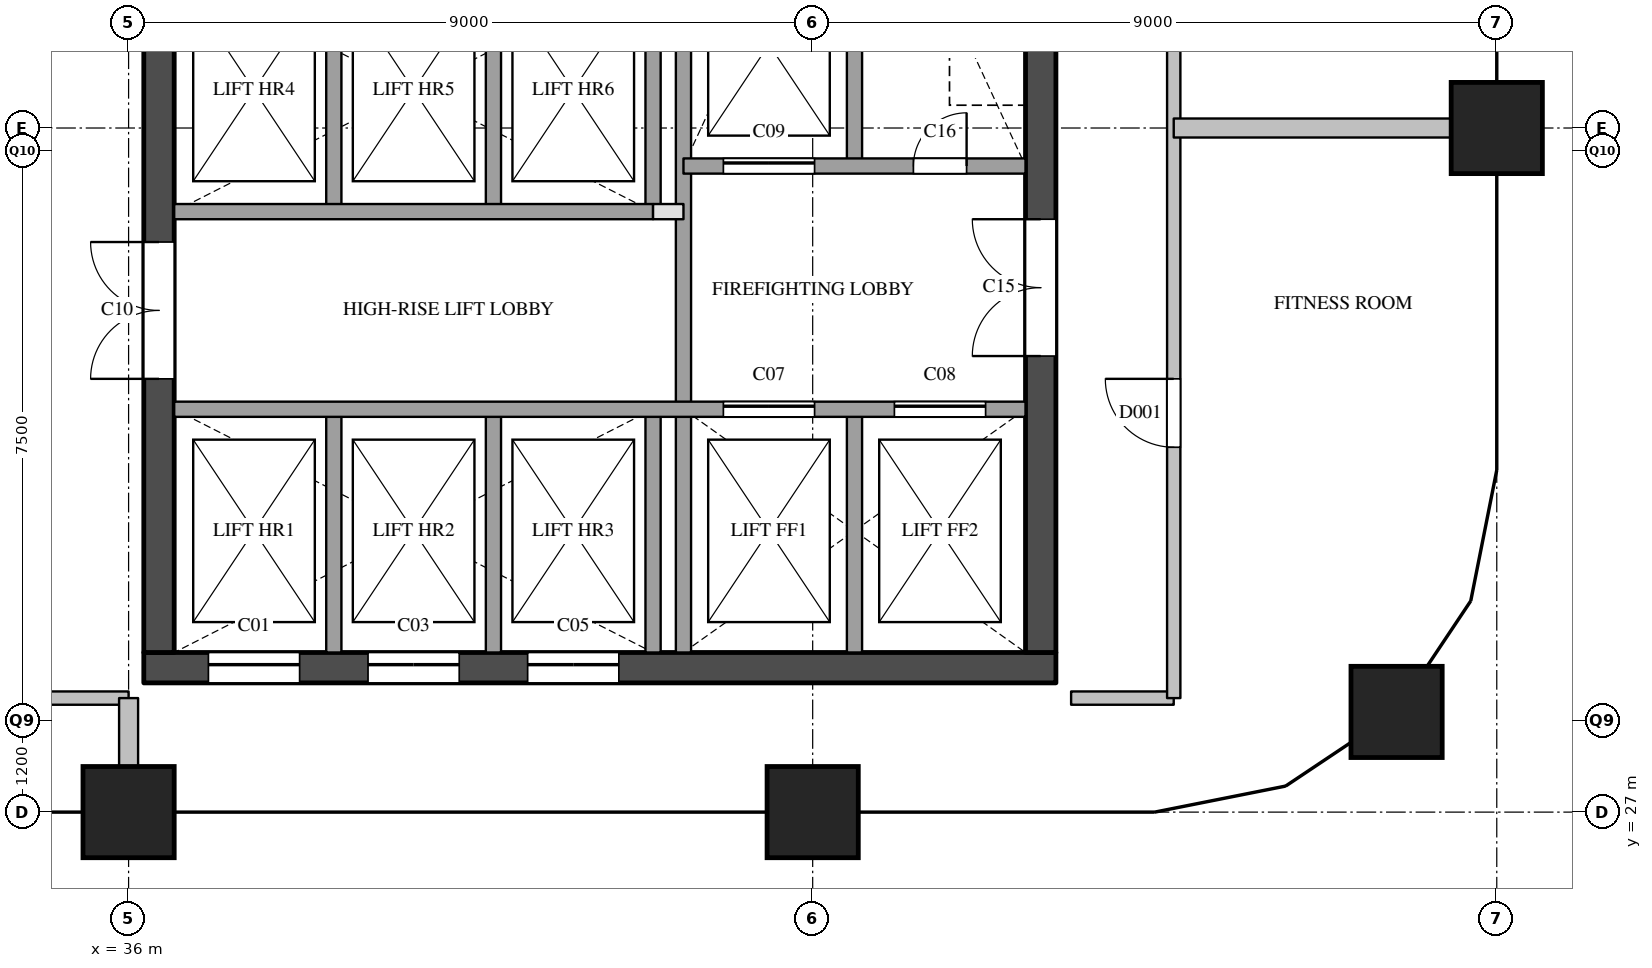
"""IFC4 building model, lengths in metres.
Left out: names, types, materials, properties, quantities, classifications, styles, units other than length and angle.
Written with IfcOpenShell. Run it as: python <this file> out.ifc"""

import sys

from ifc_helpers import new_model, si_unit, direction, frame, frame_2d, origin, origin_2d, place, context, subcontext, project, spatial, rectangle, extrude, element, fill, save


model = new_model("IFC4")
c1 = context("Model", 3, precision=1e-05, world=origin(), true_north=direction((0.0, 1.0)))
c2 = subcontext(c1, "Body", "Model", "MODEL_VIEW")
j1 = project(units=[si_unit("LENGTHUNIT", "METRE"), si_unit("PLANEANGLEUNIT", "RADIAN")], contexts=[c1])
p1 = place(None, origin())
s1 = spatial("IfcSite", under=j1, at=p1, CompositionType="ELEMENT")
p2 = place(p1, origin())
s2 = spatial("IfcBuilding", under=s1, at=p2, CompositionType="ELEMENT")
p3 = place(p2, frame((0.0, 0.0, 230.6)))
s3 = spatial("IfcBuildingStorey", under=s2, at=p3, CompositionType="ELEMENT", Elevation=230.6)
for number, where, z_axis, x_axis in (
    (1, (36.0, 27.0, 0.0), (0.0, 0.0, 1.0), (1.0, 0.0, 0.0)),
    (2, (45.0, 27.0, 0.0), (0.0, 0.0, 1.0), (1.0, 0.0, 0.0)),
    (3, (52.682, 28.318, 0.0), (0.0, 0.0, 1.0), (1.0, 0.0, 0.0)),
    (4, (54.0, 36.0, 0.0), (0.0, 0.0, 1.0), (1.0, 0.0, 0.0)),
):
    element("IfcColumn", number, at=place(p3, frame(where, z_axis=z_axis, x_axis=x_axis)), inside=s3, PredefinedType="COLUMN", context=c2, shape_type="SweptSolid", body=[
        extrude(rectangle(XDim=1.2, YDim=1.2, at=origin_2d()), origin(), (0.0, 0.0, 1.0), 3.9),
    ])
p4 = place(p3, frame((36.2, 28.9, 0.0), z_axis=(0.0, 0.0, 1.0), x_axis=(1.0, 0.0, 0.0)))
e5 = element("IfcWall", 5, at=p4, inside=s3, PredefinedType="SHEAR", context=c2, shape_type="SweptSolid", body=[
    extrude(rectangle(XDim=12.0, YDim=0.4, at=frame_2d((6.0, 0.0))), origin(), (0.0, 0.0, 1.0), 3.6),
])
p5 = place(p4, frame((0.85, 0.0, 0.0)))
e6 = element("IfcOpeningElement", 6, at=p5, cuts=e5, PredefinedType="OPENING", context=c2, shape_type="SweptSolid", body=[
    extrude(rectangle(XDim=1.2, YDim=2.1, at=frame_2d((0.6, 1.05))), frame((0.0, 0.21, 0.0), z_axis=(0.0, -1.0, 0.0), x_axis=(1.0, 0.0, 0.0)), (0.0, 0.0, 1.0), 0.42),
])
p6 = place(p4, frame((2.95, 0.0, 0.0)))
e7 = element("IfcOpeningElement", 7, at=p6, cuts=e5, PredefinedType="OPENING", context=c2, shape_type="SweptSolid", body=[
    extrude(rectangle(XDim=1.2, YDim=2.1, at=frame_2d((0.6, 1.05))), frame((0.0, 0.21, 0.0), z_axis=(0.0, -1.0, 0.0), x_axis=(1.0, 0.0, 0.0)), (0.0, 0.0, 1.0), 0.42),
])
p7 = place(p4, frame((5.05, 0.0, 0.0)))
e8 = element("IfcOpeningElement", 8, at=p7, cuts=e5, PredefinedType="OPENING", context=c2, shape_type="SweptSolid", body=[
    extrude(rectangle(XDim=1.2, YDim=2.1, at=frame_2d((0.6, 1.05))), frame((0.0, 0.21, 0.0), z_axis=(0.0, -1.0, 0.0), x_axis=(1.0, 0.0, 0.0)), (0.0, 0.0, 1.0), 0.42),
])
p8 = place(p3, frame((36.4, 29.1, 0.0), z_axis=(0.0, 0.0, 1.0), x_axis=(0.0, 1.0, 0.0)))
e9 = element("IfcWall", 9, at=p8, inside=s3, PredefinedType="SHEAR", context=c2, shape_type="SweptSolid", body=[
    extrude(rectangle(XDim=20.3, YDim=0.4, at=frame_2d((10.15, 0.0))), origin(), (0.0, 0.0, 1.0), 3.6),
])
p9 = place(p8, frame((3.6, 0.0, 0.0)))
e10 = element("IfcOpeningElement", 10, at=p9, cuts=e9, PredefinedType="OPENING", context=c2, shape_type="SweptSolid", body=[
    extrude(rectangle(XDim=1.8, YDim=2.1, at=frame_2d((0.9, 1.05))), frame((0.0, 0.21, 0.0), z_axis=(0.0, -1.0, 0.0), x_axis=(1.0, 0.0, 0.0)), (0.0, 0.0, 1.0), 0.42),
])
p10 = place(p3, frame((48.0, 29.1, 0.0), z_axis=(0.0, 0.0, 1.0), x_axis=(0.0, 1.0, 0.0)))
e11 = element("IfcWall", 11, at=p10, inside=s3, PredefinedType="SHEAR", context=c2, shape_type="SweptSolid", body=[
    extrude(rectangle(XDim=20.3, YDim=0.4, at=frame_2d((10.15, 0.0))), origin(), (0.0, 0.0, 1.0), 3.6),
])
p11 = place(p10, frame((12.5, 0.0, 0.0)))
e12 = element("IfcOpeningElement", 12, at=p11, cuts=e11, PredefinedType="OPENING", context=c2, shape_type="SweptSolid", body=[
    extrude(rectangle(XDim=0.7, YDim=2.1, at=frame_2d((0.35, 1.05))), frame((0.0, 0.21, 0.0), z_axis=(0.0, -1.0, 0.0), x_axis=(1.0, 0.0, 0.0)), (0.0, 0.0, 1.0), 0.42),
])
p12 = place(p10, frame((3.9, 0.0, 0.0)))
e13 = element("IfcOpeningElement", 13, at=p12, cuts=e11, PredefinedType="OPENING", context=c2, shape_type="SweptSolid", body=[
    extrude(rectangle(XDim=1.8, YDim=2.1, at=frame_2d((0.9, 1.05))), frame((0.0, 0.21, 0.0), z_axis=(0.0, -1.0, 0.0), x_axis=(1.0, 0.0, 0.0)), (0.0, 0.0, 1.0), 0.42),
])
p13 = place(p10, frame((16.4, 0.0, 0.0)))
e14 = element("IfcOpeningElement", 14, at=p13, cuts=e11, PredefinedType="OPENING", context=c2, shape_type="SweptSolid", body=[
    extrude(rectangle(XDim=1.0, YDim=2.1, at=frame_2d((0.5, 1.05))), frame((0.0, 0.21, 0.0), z_axis=(0.0, -1.0, 0.0), x_axis=(1.0, 0.0, 0.0)), (0.0, 0.0, 1.0), 0.42),
])
p14 = place(p3, frame((38.7, 29.1, 0.0), z_axis=(0.0, 0.0, 1.0), x_axis=(0.0, 1.0, 0.0)))
e15 = element("IfcWall", 15, at=p14, inside=s3, PredefinedType="SOLIDWALL", context=c2, shape_type="SweptSolid", body=[
    extrude(rectangle(XDim=3.2, YDim=0.2, at=frame_2d((1.6, 0.0))), origin(), (0.0, 0.0, 1.0), 3.6),
])
p15 = place(p3, frame((38.7, 34.9, 0.0), z_axis=(0.0, 0.0, 1.0), x_axis=(0.0, 1.0, 0.0)))
e16 = element("IfcWall", 16, at=p15, inside=s3, PredefinedType="SOLIDWALL", context=c2, shape_type="SweptSolid", body=[
    extrude(rectangle(XDim=3.2, YDim=0.2, at=frame_2d((1.6, 0.0))), origin(), (0.0, 0.0, 1.0), 3.6),
])
p16 = place(p3, frame((40.8, 29.1, 0.0), z_axis=(0.0, 0.0, 1.0), x_axis=(0.0, 1.0, 0.0)))
e17 = element("IfcWall", 17, at=p16, inside=s3, PredefinedType="SOLIDWALL", context=c2, shape_type="SweptSolid", body=[
    extrude(rectangle(XDim=3.2, YDim=0.2, at=frame_2d((1.6, 0.0))), origin(), (0.0, 0.0, 1.0), 3.6),
])
p17 = place(p3, frame((40.8, 34.9, 0.0), z_axis=(0.0, 0.0, 1.0), x_axis=(0.0, 1.0, 0.0)))
e18 = element("IfcWall", 18, at=p17, inside=s3, PredefinedType="SOLIDWALL", context=c2, shape_type="SweptSolid", body=[
    extrude(rectangle(XDim=3.2, YDim=0.2, at=frame_2d((1.6, 0.0))), origin(), (0.0, 0.0, 1.0), 3.6),
])
p18 = place(p3, frame((42.9, 29.1, 0.0), z_axis=(0.0, 0.0, 1.0), x_axis=(0.0, 1.0, 0.0)))
e19 = element("IfcWall", 19, at=p18, inside=s3, PredefinedType="SOLIDWALL", context=c2, shape_type="SweptSolid", body=[
    extrude(rectangle(XDim=3.2, YDim=0.2, at=frame_2d((1.6, 0.0))), origin(), (0.0, 0.0, 1.0), 3.6),
])
p19 = place(p3, frame((42.9, 34.9, 0.0), z_axis=(0.0, 0.0, 1.0), x_axis=(0.0, 1.0, 0.0)))
e20 = element("IfcWall", 20, at=p19, inside=s3, PredefinedType="SOLIDWALL", context=c2, shape_type="SweptSolid", body=[
    extrude(rectangle(XDim=3.2, YDim=0.2, at=frame_2d((1.6, 0.0))), origin(), (0.0, 0.0, 1.0), 3.6),
])
p20 = place(p3, frame((43.3, 29.1, 0.0), z_axis=(0.0, 0.0, 1.0), x_axis=(0.0, 1.0, 0.0)))
e21 = element("IfcWall", 21, at=p20, inside=s3, PredefinedType="SOLIDWALL", context=c2, shape_type="SweptSolid", body=[
    extrude(rectangle(XDim=9.9, YDim=0.2, at=frame_2d((4.95, 0.0))), origin(), (0.0, 0.0, 1.0), 3.6),
])
for number, where, z_axis, x_axis in (
    (22, (45.55, 29.1, 0.0), (0.0, 0.0, 1.0), (0.0, 1.0, 0.0)),
    (23, (45.55, 35.5, 0.0), (0.0, 0.0, 1.0), (0.0, 1.0, 0.0)),
):
    element("IfcWall", number, at=place(p3, frame(where, z_axis=z_axis, x_axis=x_axis)), inside=s3, PredefinedType="SOLIDWALL", context=c2, shape_type="SweptSolid", body=[
        extrude(rectangle(XDim=3.2, YDim=0.2, at=frame_2d((1.6, 0.0))), origin(), (0.0, 0.0, 1.0), 3.6),
    ])
p21 = place(p3, frame((36.6, 32.3, 0.0), z_axis=(0.0, 0.0, 1.0), x_axis=(1.0, 0.0, 0.0)))
e24 = element("IfcWall", 24, at=p21, inside=s3, PredefinedType="SOLIDWALL", context=c2, shape_type="SweptSolid", body=[
    extrude(rectangle(XDim=11.2, YDim=0.2, at=frame_2d((5.6, 0.0))), origin(), (0.0, 0.0, 1.0), 3.6),
])
p22 = place(p21, frame((7.225, 0.0, 0.0)))
e25 = element("IfcOpeningElement", 25, at=p22, cuts=e24, PredefinedType="OPENING", context=c2, shape_type="SweptSolid", body=[
    extrude(rectangle(XDim=1.2, YDim=2.1, at=frame_2d((0.6, 1.05))), frame((0.0, 0.11, 0.0), z_axis=(0.0, -1.0, 0.0), x_axis=(1.0, 0.0, 0.0)), (0.0, 0.0, 1.0), 0.22),
])
p23 = place(p21, frame((9.475, 0.0, 0.0)))
e26 = element("IfcOpeningElement", 26, at=p23, cuts=e24, PredefinedType="OPENING", context=c2, shape_type="SweptSolid", body=[
    extrude(rectangle(XDim=1.2, YDim=2.1, at=frame_2d((0.6, 1.05))), frame((0.0, 0.11, 0.0), z_axis=(0.0, -1.0, 0.0), x_axis=(1.0, 0.0, 0.0)), (0.0, 0.0, 1.0), 0.22),
])
p24 = place(p3, frame((42.9, 34.9, 0.0), z_axis=(0.0, 0.0, 1.0), x_axis=(1.0, 0.0, 0.0)))
e27 = element("IfcWall", 27, at=p24, inside=s3, PredefinedType="PARTITIONING", context=c2, shape_type="SweptSolid", body=[
    extrude(rectangle(XDim=0.4, YDim=0.2, at=frame_2d((0.2, 0.0))), origin(), (0.0, 0.0, 1.0), 3.6),
])
p25 = place(p3, frame((36.6, 34.9, 0.0), z_axis=(0.0, 0.0, 1.0), x_axis=(1.0, 0.0, 0.0)))
e28 = element("IfcWall", 28, at=p25, inside=s3, PredefinedType="SOLIDWALL", context=c2, shape_type="SweptSolid", body=[
    extrude(rectangle(XDim=6.3, YDim=0.2, at=frame_2d((3.15, 0.0))), origin(), (0.0, 0.0, 1.0), 3.6),
])
p26 = place(p3, frame((43.3, 35.5, 0.0), z_axis=(0.0, 0.0, 1.0), x_axis=(1.0, 0.0, 0.0)))
e29 = element("IfcWall", 29, at=p26, inside=s3, PredefinedType="SOLIDWALL", context=c2, shape_type="SweptSolid", body=[
    extrude(rectangle(XDim=4.5, YDim=0.2, at=frame_2d((2.25, 0.0))), origin(), (0.0, 0.0, 1.0), 3.6),
])
p27 = place(p26, frame((0.525, 0.0, 0.0)))
e30 = element("IfcOpeningElement", 30, at=p27, cuts=e29, PredefinedType="OPENING", context=c2, shape_type="SweptSolid", body=[
    extrude(rectangle(XDim=1.2, YDim=2.1, at=frame_2d((0.6, 1.05))), frame((0.0, 0.11, 0.0), z_axis=(0.0, -1.0, 0.0), x_axis=(1.0, 0.0, 0.0)), (0.0, 0.0, 1.0), 0.22),
])
p28 = place(p26, frame((3.025, 0.0, 0.0)))
e31 = element("IfcOpeningElement", 31, at=p28, cuts=e29, PredefinedType="OPENING", context=c2, shape_type="SweptSolid", body=[
    extrude(rectangle(XDim=0.7, YDim=2.1, at=frame_2d((0.35, 1.05))), frame((0.0, 0.11, 0.0), z_axis=(0.0, -1.0, 0.0), x_axis=(1.0, 0.0, 0.0)), (0.0, 0.0, 1.0), 0.22),
])
for number, where, z_axis, x_axis in (
    (32, (34.65, 28.5, 0.0), (0.0, 0.0, 1.0), (1.0, 0.0, 0.0)),
    (33, (48.4, 28.5, 0.0), (0.0, 0.0, 1.0), (1.0, 0.0, 0.0)),
):
    element("IfcWall", number, at=place(p3, frame(where, z_axis=z_axis, x_axis=x_axis)), inside=s3, PredefinedType="PARTITIONING", context=c2, shape_type="SweptSolid", body=[
        extrude(rectangle(XDim=1.35, YDim=0.175, at=frame_2d((0.675, 0.0))), origin(), (0.0, 0.0, 1.0), 3.6),
    ])
p29 = place(p3, frame((49.75, 28.5, 0.0), z_axis=(0.0, 0.0, 1.0), x_axis=(0.0, 1.0, 0.0)))
e34 = element("IfcWall", 34, at=p29, inside=s3, PredefinedType="PARTITIONING", context=c2, shape_type="SweptSolid", body=[
    extrude(rectangle(XDim=22.85, YDim=0.175, at=frame_2d((11.425, 0.0))), origin(), (0.0, 0.0, 1.0), 3.6),
])
p30 = place(p29, frame((3.3, 0.0, 0.0)))
e35 = element("IfcOpeningElement", 35, at=p30, cuts=e34, PredefinedType="OPENING", context=c2, shape_type="SweptSolid", body=[
    extrude(rectangle(XDim=0.9, YDim=2.1, at=frame_2d((0.45, 1.05))), frame((0.0, 0.097, 0.0), z_axis=(0.0, -1.0, 0.0), x_axis=(1.0, 0.0, 0.0)), (0.0, 0.0, 1.0), 0.195),
])
p31 = place(p29, frame((11.55, 0.0, 0.0)))
e36 = element("IfcOpeningElement", 36, at=p31, cuts=e34, PredefinedType="OPENING", context=c2, shape_type="SweptSolid", body=[
    extrude(rectangle(XDim=0.9, YDim=2.1, at=frame_2d((0.45, 1.05))), frame((0.0, 0.097, 0.0), z_axis=(0.0, -1.0, 0.0), x_axis=(1.0, 0.0, 0.0)), (0.0, 0.0, 1.0), 0.195),
])
p32 = place(p29, frame((19.225, 0.0, 0.0)))
e37 = element("IfcOpeningElement", 37, at=p32, cuts=e34, PredefinedType="OPENING", context=c2, shape_type="SweptSolid", body=[
    extrude(rectangle(XDim=0.9, YDim=2.1, at=frame_2d((0.45, 1.05))), frame((0.0, 0.097, 0.0), z_axis=(0.0, -1.0, 0.0), x_axis=(1.0, 0.0, 0.0)), (0.0, 0.0, 1.0), 0.195),
])
p33 = place(p3, frame((49.75, 36.0, 0.0), z_axis=(0.0, 0.0, 1.0), x_axis=(1.0, 0.0, 0.0)))
e38 = element("IfcWall", 38, at=p33, inside=s3, PredefinedType="PARTITIONING", context=c2, shape_type="SweptSolid", body=[
    extrude(rectangle(XDim=4.25, YDim=0.25, at=frame_2d((2.125, 0.0))), origin(), (0.0, 0.0, 1.0), 3.6),
])
p34 = place(p3, frame((36.0, 27.0, 0.0), z_axis=(0.0, 0.0, 1.0), x_axis=(0.0, 1.0, 0.0)))
e39 = element("IfcWall", 39, at=p34, inside=s3, PredefinedType="PARTITIONING", context=c2, shape_type="SweptSolid", body=[
    extrude(rectangle(XDim=1.5, YDim=0.25, at=frame_2d((0.75, 0.0))), origin(), (0.0, 0.0, 1.0), 3.6),
])
p35 = place(p5, origin())
e40 = element("IfcDoor", 40, at=p35, inside=s3, OperationType="SLIDING_TO_LEFT", PredefinedType="DOOR", context=c2, shape_type="SweptSolid", body=[
    extrude(rectangle(XDim=1.2, YDim=2.1, at=frame_2d((0.6, 1.05))), frame((0.0, 0.025, 0.0), z_axis=(0.0, -1.0, 0.0), x_axis=(1.0, 0.0, 0.0)), (0.0, 0.0, 1.0), 0.05),
])
fill(e6, e40)
p36 = place(p6, origin())
e41 = element("IfcDoor", 41, at=p36, inside=s3, OperationType="SLIDING_TO_LEFT", PredefinedType="DOOR", context=c2, shape_type="SweptSolid", body=[
    extrude(rectangle(XDim=1.2, YDim=2.1, at=frame_2d((0.6, 1.05))), frame((0.0, 0.025, 0.0), z_axis=(0.0, -1.0, 0.0), x_axis=(1.0, 0.0, 0.0)), (0.0, 0.0, 1.0), 0.05),
])
fill(e7, e41)
p37 = place(p7, origin())
e42 = element("IfcDoor", 42, at=p37, inside=s3, OperationType="SLIDING_TO_LEFT", PredefinedType="DOOR", context=c2, shape_type="SweptSolid", body=[
    extrude(rectangle(XDim=1.2, YDim=2.1, at=frame_2d((0.6, 1.05))), frame((0.0, 0.025, 0.0), z_axis=(0.0, -1.0, 0.0), x_axis=(1.0, 0.0, 0.0)), (0.0, 0.0, 1.0), 0.05),
])
fill(e8, e42)
p38 = place(p22, origin())
e43 = element("IfcDoor", 43, at=p38, inside=s3, OperationType="SLIDING_TO_LEFT", PredefinedType="DOOR", context=c2, shape_type="SweptSolid", body=[
    extrude(rectangle(XDim=1.2, YDim=2.1, at=frame_2d((0.6, 1.05))), frame((0.0, 0.025, 0.0), z_axis=(0.0, -1.0, 0.0), x_axis=(1.0, 0.0, 0.0)), (0.0, 0.0, 1.0), 0.05),
])
fill(e25, e43)
p39 = place(p23, origin())
e44 = element("IfcDoor", 44, at=p39, inside=s3, OperationType="SLIDING_TO_LEFT", PredefinedType="DOOR", context=c2, shape_type="SweptSolid", body=[
    extrude(rectangle(XDim=1.2, YDim=2.1, at=frame_2d((0.6, 1.05))), frame((0.0, 0.025, 0.0), z_axis=(0.0, -1.0, 0.0), x_axis=(1.0, 0.0, 0.0)), (0.0, 0.0, 1.0), 0.05),
])
fill(e26, e44)
p40 = place(p27, origin())
e45 = element("IfcDoor", 45, at=p40, inside=s3, OperationType="SLIDING_TO_LEFT", PredefinedType="DOOR", context=c2, shape_type="SweptSolid", body=[
    extrude(rectangle(XDim=1.2, YDim=2.1, at=frame_2d((0.6, 1.05))), frame((0.0, 0.025, 0.0), z_axis=(0.0, -1.0, 0.0), x_axis=(1.0, 0.0, 0.0)), (0.0, 0.0, 1.0), 0.05),
])
fill(e30, e45)
p41 = place(p9, origin())
e46 = element("IfcDoor", 46, at=p41, inside=s3, OperationType="DOUBLE_DOOR_SINGLE_SWING", PredefinedType="DOOR", context=c2, shape_type="SweptSolid", body=[
    extrude(rectangle(XDim=1.8, YDim=2.1, at=frame_2d((0.9, 1.05))), frame((0.0, 0.025, 0.0), z_axis=(0.0, -1.0, 0.0), x_axis=(1.0, 0.0, 0.0)), (0.0, 0.0, 1.0), 0.05),
])
fill(e10, e46)
p42 = place(p12, origin())
e47 = element("IfcDoor", 47, at=p42, inside=s3, OperationType="DOUBLE_DOOR_SINGLE_SWING", PredefinedType="DOOR", context=c2, shape_type="SweptSolid", body=[
    extrude(rectangle(XDim=1.8, YDim=2.1, at=frame_2d((0.9, 1.05))), frame((0.0, 0.025, 0.0), z_axis=(0.0, -1.0, 0.0), x_axis=(1.0, 0.0, 0.0)), (0.0, 0.0, 1.0), 0.05),
])
fill(e13, e47)
p43 = place(p28, origin())
e48 = element("IfcDoor", 48, at=p43, inside=s3, OperationType="SINGLE_SWING_RIGHT", PredefinedType="DOOR", context=c2, shape_type="SweptSolid", body=[
    extrude(rectangle(XDim=0.7, YDim=2.1, at=frame_2d((0.35, 1.05))), frame((0.0, 0.025, 0.0), z_axis=(0.0, -1.0, 0.0), x_axis=(1.0, 0.0, 0.0)), (0.0, 0.0, 1.0), 0.05),
])
fill(e31, e48)
p44 = place(p30, origin())
e49 = element("IfcDoor", 49, at=p44, inside=s3, OperationType="SINGLE_SWING_RIGHT", PredefinedType="DOOR", context=c2, shape_type="SweptSolid", body=[
    extrude(rectangle(XDim=0.9, YDim=2.1, at=frame_2d((0.45, 1.05))), frame((0.0, 0.025, 0.0), z_axis=(0.0, -1.0, 0.0), x_axis=(1.0, 0.0, 0.0)), (0.0, 0.0, 1.0), 0.05),
])
fill(e35, e49)
save(model, sys.argv[1])
